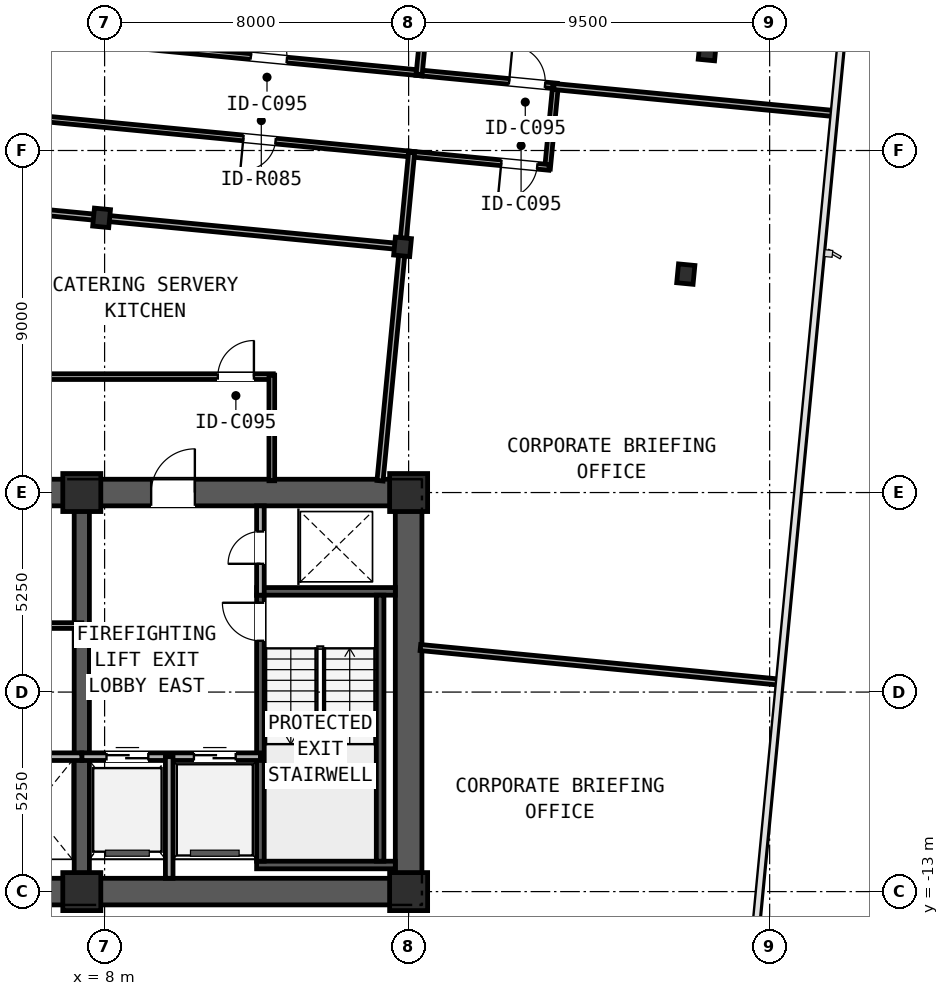
"""IFC4 building model, lengths in metres.
Left out: names, types, materials, properties, quantities, classifications, styles, units other than length and angle.
Written with IfcOpenShell. Run it as: python <this file> out.ifc"""

import sys

from ifc_helpers import new_model, si_unit, direction, frame, frame_2d, origin, origin_2d, place, context, subcontext, project, spatial, rectangle, i_section, extrude, element, fill, save


model = new_model("IFC4")
c1 = context("Model", 3, precision=1e-05, world=origin(), true_north=direction((0.0, 1.0)))
c2 = subcontext(c1, "Body", "Model", "MODEL_VIEW")
j1 = project(units=[si_unit("LENGTHUNIT", "METRE"), si_unit("PLANEANGLEUNIT", "RADIAN")], contexts=[c1])
p1 = place(None, origin())
s1 = spatial("IfcSite", under=j1, at=p1, CompositionType="ELEMENT")
p2 = place(p1, origin())
s2 = spatial("IfcBuilding", under=s1, at=p2, CompositionType="ELEMENT")
p3 = place(p2, frame((0.0, 0.0, 163.5)))
s3 = spatial("IfcBuildingStorey", under=s2, at=p3, CompositionType="ELEMENT", Elevation=163.5)
p4 = place(p3, frame((-16.35, -13.0, 0.0), z_axis=(0.0, 0.0, 1.0), x_axis=(1.0, 0.0, 0.0)))
e1 = element("IfcWall", 1, at=p4, inside=s3, PredefinedType="SHEAR", context=c2, shape_type="SweptSolid", body=[
    extrude(rectangle(XDim=32.7, YDim=0.7, at=frame_2d((16.35, 0.0))), origin(), (0.0, 0.0, 1.0), 2.91),
])
p5 = place(p3, frame((-16.35, -2.5, 0.0), z_axis=(0.0, 0.0, 1.0), x_axis=(1.0, 0.0, 0.0)))
e2 = element("IfcWall", 2, at=p5, inside=s3, PredefinedType="SHEAR", context=c2, shape_type="SweptSolid", body=[
    extrude(rectangle(XDim=32.7, YDim=0.7, at=frame_2d((16.35, 0.0))), origin(), (0.0, 0.0, 1.0), 2.91),
])
p6 = place(p5, frame((5.975, 0.0, 0.0)))
e3 = element("IfcOpeningElement", 3, at=p6, cuts=e2, PredefinedType="OPENING", context=c2, shape_type="SweptSolid", body=[
    extrude(rectangle(XDim=1.15, YDim=2.0, at=frame_2d((0.575, 1.0))), frame((0.0, 0.36, 0.0), z_axis=(0.0, -1.0, 0.0), x_axis=(1.0, 0.0, 0.0)), (0.0, 0.0, 1.0), 0.72),
])
p7 = place(p5, frame((15.55, 0.0, 0.0)))
e4 = element("IfcOpeningElement", 4, at=p7, cuts=e2, PredefinedType="OPENING", context=c2, shape_type="SweptSolid", body=[
    extrude(rectangle(XDim=1.6, YDim=2.0, at=frame_2d((0.8, 1.0))), frame((0.0, 0.36, 0.0), z_axis=(0.0, -1.0, 0.0), x_axis=(1.0, 0.0, 0.0)), (0.0, 0.0, 1.0), 0.72),
])
p8 = place(p5, frame((25.575, 0.0, 0.0)))
e5 = element("IfcOpeningElement", 5, at=p8, cuts=e2, PredefinedType="OPENING", context=c2, shape_type="SweptSolid", body=[
    extrude(rectangle(XDim=1.15, YDim=2.0, at=frame_2d((0.575, 1.0))), frame((0.0, 0.36, 0.0), z_axis=(0.0, -1.0, 0.0), x_axis=(1.0, 0.0, 0.0)), (0.0, 0.0, 1.0), 0.72),
])
p9 = place(p3, frame((16.0, -12.65, 0.0), z_axis=(0.0, 0.0, 1.0), x_axis=(0.0, 1.0, 0.0)))
e6 = element("IfcWall", 6, at=p9, inside=s3, PredefinedType="SHEAR", context=c2, shape_type="SweptSolid", body=[
    extrude(rectangle(XDim=9.8, YDim=0.7, at=frame_2d((4.9, 0.0))), origin(), (0.0, 0.0, 1.0), 2.91),
])
p10 = place(p3, frame((7.4, -12.65, 0.0), z_axis=(0.0, 0.0, 1.0), x_axis=(0.0, 1.0, 0.0)))
e7 = element("IfcWall", 7, at=p10, inside=s3, PredefinedType="SHEAR", context=c2, shape_type="SweptSolid", body=[
    extrude(rectangle(XDim=9.8, YDim=0.4, at=frame_2d((4.9, 0.0))), origin(), (0.0, 0.0, 1.0), 3.19),
])
for number, where, z_axis, x_axis in (
    (8, (12.0, -12.3, 0.0), (0.0, 0.0, 1.0), (1.0, 0.0, 0.0)),
    (9, (12.0, -5.1, 0.0), (0.0, 0.0, 1.0), (1.0, 0.0, 0.0)),
):
    element("IfcWall", number, at=place(p3, frame(where, z_axis=z_axis, x_axis=x_axis)), inside=s3, PredefinedType="SOLIDWALL", context=c2, shape_type="SweptSolid", body=[
        extrude(rectangle(XDim=3.65, YDim=0.2, at=frame_2d((1.825, 0.0))), origin(), (0.0, 0.0, 1.0), 3.19),
    ])
p11 = place(p3, frame((12.1, -12.2, 0.0), z_axis=(0.0, 0.0, 1.0), x_axis=(0.0, 1.0, 0.0)))
e10 = element("IfcWall", 10, at=p11, inside=s3, PredefinedType="SOLIDWALL", context=c2, shape_type="SweptSolid", body=[
    extrude(rectangle(XDim=7.0, YDim=0.2, at=frame_2d((3.5, 0.0))), origin(), (0.0, 0.0, 1.0), 3.19),
])
p12 = place(p11, frame((5.8, 0.0, 0.0)))
e11 = element("IfcOpeningElement", 11, at=p12, cuts=e10, PredefinedType="OPENING", context=c2, shape_type="SweptSolid", body=[
    extrude(rectangle(XDim=1.0, YDim=2.1, at=frame_2d((0.5, 1.05))), frame((0.0, 0.11, 0.0), z_axis=(0.0, -1.0, 0.0), x_axis=(1.0, 0.0, 0.0)), (0.0, 0.0, 1.0), 0.22),
])
p13 = place(p3, frame((15.25, -12.2, 0.0), z_axis=(0.0, 0.0, 1.0), x_axis=(0.0, 1.0, 0.0)))
e12 = element("IfcWall", 12, at=p13, inside=s3, PredefinedType="SOLIDWALL", context=c2, shape_type="SweptSolid", body=[
    extrude(rectangle(XDim=7.0, YDim=0.2, at=frame_2d((3.5, 0.0))), origin(), (0.0, 0.0, 1.0), 3.19),
])
for number, where, z_axis, x_axis in (
    (13, (7.4, -13.0, 0.0), (0.0, 0.0, 1.0), (1.0, 0.0, 0.0)),
    (14, (16.0, -13.0, 0.0), (0.0, 0.0, 1.0), (1.0, 0.0, 0.0)),
    (15, (7.4, -2.5, 0.0), (0.0, 0.0, 1.0), (1.0, 0.0, 0.0)),
    (16, (16.0, -2.5, 0.0), (0.0, 0.0, 1.0), (1.0, 0.0, 0.0)),
):
    element("IfcColumn", number, at=place(p3, frame(where, z_axis=z_axis, x_axis=x_axis)), inside=s3, PredefinedType="COLUMN", context=c2, shape_type="SweptSolid", body=[
        extrude(rectangle(XDim=1.0, YDim=1.0, at=origin_2d()), origin(), (0.0, 0.0, 1.0), 3.45),
    ])
for number, where, z_axis, x_axis in (
    (17, (7.921, 4.728, 0.0), (0.0, 0.0, 1.0), (0.995, -0.096, 0.0)),
    (18, (15.84, 3.965, 0.0), (0.0, 0.0, 1.0), (0.995, -0.096, 0.0)),
):
    element("IfcColumn", number, at=place(p3, frame(where, z_axis=z_axis, x_axis=x_axis)), inside=s3, PredefinedType="COLUMN", context=c2, shape_type="SweptSolid", body=[
        extrude(i_section(OverallWidth=0.424, OverallDepth=0.474, WebThickness=0.048, FlangeThickness=0.077, FilletRadius=0.031, at=origin_2d()), origin(), (0.0, 0.0, 1.0), 3.45),
    ])
for number, where, z_axis, x_axis in (
    (19, (23.293, 3.248, 0.0), (0.0, 0.0, 1.0), (0.995, -0.096, 0.0)),
    (20, (23.86, 9.128, 0.0), (0.0, 0.0, 1.0), (0.995, -0.096, 0.0)),
):
    element("IfcColumn", number, at=place(p3, frame(where, z_axis=z_axis, x_axis=x_axis)), inside=s3, PredefinedType="COLUMN", context=c2, shape_type="SweptSolid", body=[
        extrude(i_section(OverallWidth=0.432, OverallDepth=0.498, WebThickness=0.056, FlangeThickness=0.089, FilletRadius=0.031, at=origin_2d()), origin(), (0.0, 0.0, 1.0), 3.45),
    ])
p14 = place(p3, frame((-26.695, -13.016, 0.0), z_axis=(0.0, 0.0, 1.0), x_axis=(0.995396268366, -0.095845025554, 0.0)))
e21 = element("IfcWall", 21, at=p14, inside=s3, PredefinedType="STANDARD", context=c2, shape_type="SweptSolid", body=[
    extrude(rectangle(XDim=49.6, YDim=0.24, at=frame_2d((24.8, 0.0))), origin(), (0.0, 0.0, 1.0), 3.19),
])
p15 = place(p14, frame((6.044, 0.0, 0.7)))
e22 = element("IfcOpeningElement", 22, at=p15, cuts=e21, PredefinedType="OPENING", context=c2, shape_type="SweptSolid", body=[
    extrude(rectangle(XDim=1.8, YDim=1.5, at=frame_2d((0.9, 0.75))), frame((0.0, 0.13, 0.0), z_axis=(0.0, -1.0, 0.0), x_axis=(1.0, 0.0, 0.0)), (0.0, 0.0, 1.0), 0.26),
])
p16 = place(p14, frame((41.756, 0.0, 0.7)))
e23 = element("IfcOpeningElement", 23, at=p16, cuts=e21, PredefinedType="OPENING", context=c2, shape_type="SweptSolid", body=[
    extrude(rectangle(XDim=1.8, YDim=1.5, at=frame_2d((0.9, 0.75))), frame((0.0, 0.13, 0.0), z_axis=(0.0, -1.0, 0.0), x_axis=(1.0, 0.0, 0.0)), (0.0, 0.0, 1.0), 0.26),
])
p17 = place(p3, frame((12.1, -5.2, 0.0), z_axis=(0.0, 0.0, 1.0), x_axis=(0.0, 1.0, 0.0)))
e24 = element("IfcWall", 24, at=p17, inside=s3, PredefinedType="PARTITIONING", context=c2, shape_type="SweptSolid", body=[
    extrude(rectangle(XDim=2.35, YDim=0.2, at=frame_2d((1.175, 0.0))), origin(), (0.0, 0.0, 1.0), 2.225),
])
p18 = place(p17, frame((0.825, 0.0, 0.0)))
e25 = element("IfcOpeningElement", 25, at=p18, cuts=e24, PredefinedType="OPENING", context=c2, shape_type="SweptSolid", body=[
    extrude(rectangle(XDim=0.85, YDim=2.05, at=frame_2d((0.425, 1.025))), frame((0.0, 0.11, 0.0), z_axis=(0.0, -1.0, 0.0), x_axis=(1.0, 0.0, 0.0)), (0.0, 0.0, 1.0), 0.22),
])
p19 = place(p3, frame((7.4, -9.45, 0.0), z_axis=(0.0, 0.0, 1.0), x_axis=(1.0, 0.0, 0.0)))
e26 = element("IfcWall", 26, at=p19, inside=s3, PredefinedType="PARTITIONING", context=c2, shape_type="SweptSolid", body=[
    extrude(rectangle(XDim=4.7, YDim=0.2, at=frame_2d((2.35, 0.0))), origin(), (0.0, 0.0, 1.0), 3.19),
])
p20 = place(p19, frame((2.95, 0.0, 0.0)))
e27 = element("IfcOpeningElement", 27, at=p20, cuts=e26, PredefinedType="OPENING", context=c2, shape_type="SweptSolid", body=[
    extrude(rectangle(XDim=1.1, YDim=2.2, at=frame_2d((0.55, 1.1))), frame((0.0, 0.11, 0.0), z_axis=(0.0, -1.0, 0.0), x_axis=(1.0, 0.0, 0.0)), (0.0, 0.0, 1.0), 0.22),
])
p21 = place(p19, frame((0.65, 0.0, 0.0)))
e28 = element("IfcOpeningElement", 28, at=p21, cuts=e26, PredefinedType="OPENING", context=c2, shape_type="SweptSolid", body=[
    extrude(rectangle(XDim=1.1, YDim=2.2, at=frame_2d((0.55, 1.1))), frame((0.0, 0.11, 0.0), z_axis=(0.0, -1.0, 0.0), x_axis=(1.0, 0.0, 0.0)), (0.0, 0.0, 1.0), 0.22),
])
p22 = place(p3, frame((9.7, -12.65, 0.0), z_axis=(0.0, 0.0, 1.0), x_axis=(0.0, 1.0, 0.0)))
e29 = element("IfcWall", 29, at=p22, inside=s3, PredefinedType="PARTITIONING", context=c2, shape_type="SweptSolid", body=[
    extrude(rectangle(XDim=3.2, YDim=0.2, at=frame_2d((1.6, 0.0))), origin(), (0.0, 0.0, 1.0), 2.225),
])
p23 = place(p3, frame((2.55, -9.45, 0.0), z_axis=(0.0, 0.0, 1.0), x_axis=(1.0, 0.0, 0.0)))
e30 = element("IfcWall", 30, at=p23, inside=s3, PredefinedType="PARTITIONING", context=c2, shape_type="SweptSolid", body=[
    extrude(rectangle(XDim=4.85, YDim=0.2, at=frame_2d((2.425, 0.0))), origin(), (0.0, 0.0, 1.0), 3.19),
])
p24 = place(p3, frame((1.6, -6.0, 0.0), z_axis=(0.0, 0.0, 1.0), x_axis=(1.0, 0.0, 0.0)))
e31 = element("IfcWall", 31, at=p24, inside=s3, PredefinedType="PARTITIONING", context=c2, shape_type="SweptSolid", body=[
    extrude(rectangle(XDim=5.8, YDim=0.15, at=frame_2d((2.9, 0.0))), origin(), (0.0, 0.0, 1.0), 3.19),
])
p25 = place(p24, frame((1.2, 0.0, 0.0)))
e32 = element("IfcOpeningElement", 32, at=p25, cuts=e31, PredefinedType="OPENING", context=c2, shape_type="SweptSolid", body=[
    extrude(rectangle(XDim=0.9, YDim=2.1, at=frame_2d((0.45, 1.05))), frame((0.0, 0.085, 0.0), z_axis=(0.0, -1.0, 0.0), x_axis=(1.0, 0.0, 0.0)), (0.0, 0.0, 1.0), 0.17),
])
p26 = place(p24, frame((4.025, 0.0, 0.0)))
e33 = element("IfcOpeningElement", 33, at=p26, cuts=e31, PredefinedType="OPENING", context=c2, shape_type="SweptSolid", body=[
    extrude(rectangle(XDim=0.85, YDim=2.05, at=frame_2d((0.425, 1.025))), frame((0.0, 0.085, 0.0), z_axis=(0.0, -1.0, 0.0), x_axis=(1.0, 0.0, 0.0)), (0.0, 0.0, 1.0), 0.17),
])
p27 = place(p3, frame((8.28, 9.314, 0.0), z_axis=(0.0, 0.0, 1.0), x_axis=(0.995395467524, -0.095853342309, 0.0)))
e34 = element("IfcWall", 34, at=p27, inside=s3, PredefinedType="PARTITIONING", context=c2, shape_type="SweptSolid", body=[
    extrude(rectangle(XDim=8.12, YDim=0.15, at=frame_2d((4.06, 0.0))), origin(), (0.0, 0.0, 1.0), 2.479),
])
p28 = place(p27, frame((3.585, 0.0, 0.0)))
e35 = element("IfcOpeningElement", 35, at=p28, cuts=e34, PredefinedType="OPENING", context=c2, shape_type="SweptSolid", body=[
    extrude(rectangle(XDim=0.95, YDim=2.15, at=frame_2d((0.475, 1.075))), frame((0.0, 0.085, 0.0), z_axis=(0.0, -1.0, 0.0), x_axis=(1.0, 0.0, 0.0)), (0.0, 0.0, 1.0), 0.17),
])
p29 = place(p3, frame((16.199, 8.552, 0.0), z_axis=(0.0, 0.0, 1.0), x_axis=(0.995391104887, -0.095898635608, 0.0)))
e36 = element("IfcWall", 36, at=p29, inside=s3, PredefinedType="PARTITIONING", context=c2, shape_type="SweptSolid", body=[
    extrude(rectangle(XDim=3.722, YDim=0.15, at=frame_2d((1.861, 0.0))), origin(), (0.0, 0.0, 1.0), 2.479),
])
p30 = place(p29, frame((2.457, 0.0, 0.0)))
e37 = element("IfcOpeningElement", 37, at=p30, cuts=e36, PredefinedType="OPENING", context=c2, shape_type="SweptSolid", body=[
    extrude(rectangle(XDim=0.95, YDim=2.15, at=frame_2d((0.475, 1.075))), frame((0.0, 0.085, 0.0), z_axis=(0.0, -1.0, 0.0), x_axis=(1.0, 0.0, 0.0)), (0.0, 0.0, 1.0), 0.17),
])
p31 = place(p3, frame((16.156, 6.396, 0.0), z_axis=(0.0, 0.0, 1.0), x_axis=(-0.99539478422, 0.095860437863, 0.0)))
e38 = element("IfcWall", 38, at=p31, inside=s3, PredefinedType="PARTITIONING", context=c2, shape_type="SweptSolid", body=[
    extrude(rectangle(XDim=10.936, YDim=0.15, at=frame_2d((5.468, 0.0))), origin(), (0.0, 0.0, 1.0), 2.479),
])
p32 = place(p31, frame((3.675, 0.0, 0.0)))
e39 = element("IfcOpeningElement", 39, at=p32, cuts=e38, PredefinedType="OPENING", context=c2, shape_type="SweptSolid", body=[
    extrude(rectangle(XDim=0.85, YDim=2.05, at=frame_2d((0.425, 1.025))), frame((0.0, 0.085, 0.0), z_axis=(0.0, -1.0, 0.0), x_axis=(1.0, 0.0, 0.0)), (0.0, 0.0, 1.0), 0.17),
])
p33 = place(p3, frame((4.607, 0.55, 0.0), z_axis=(0.0, 0.0, 1.0), x_axis=(1.0, 0.0, 0.0)))
e40 = element("IfcWall", 40, at=p33, inside=s3, PredefinedType="PARTITIONING", context=c2, shape_type="SweptSolid", body=[
    extrude(rectangle(XDim=7.833, YDim=0.15, at=frame_2d((3.917, 0.0))), origin(), (0.0, 0.0, 1.0), 2.479),
])
p34 = place(p33, frame((6.372, 0.0, 0.0)))
e41 = element("IfcOpeningElement", 41, at=p34, cuts=e40, PredefinedType="OPENING", context=c2, shape_type="SweptSolid", body=[
    extrude(rectangle(XDim=0.95, YDim=2.15, at=frame_2d((0.475, 1.075))), frame((0.0, 0.085, 0.0), z_axis=(0.0, -1.0, 0.0), x_axis=(1.0, 0.0, 0.0)), (0.0, 0.0, 1.0), 0.17),
])
p35 = place(p3, frame((12.4, 0.59, 0.0), z_axis=(0.0, 0.0, 1.0), x_axis=(0.0, -1.0, 0.0)))
e42 = element("IfcWall", 42, at=p35, inside=s3, PredefinedType="PARTITIONING", context=c2, shape_type="SweptSolid", body=[
    extrude(rectangle(XDim=2.78, YDim=0.15, at=frame_2d((1.39, 0.0))), origin(), (0.0, 0.0, 1.0), 2.225),
])
p36 = place(p3, frame((19.866, 8.219, 0.0), z_axis=(0.0, 0.0, 1.0), x_axis=(-0.095773447772, -0.995403157872, 0.0)))
e43 = element("IfcWall", 43, at=p36, inside=s3, PredefinedType="PARTITIONING", context=c2, shape_type="SweptSolid", body=[
    extrude(rectangle(XDim=2.21, YDim=0.15, at=frame_2d((1.105, 0.0))), origin(), (0.0, 0.0, 1.0), 2.718),
])
p37 = place(p3, frame((19.698, 6.055, 0.0), z_axis=(0.0, 0.0, 1.0), x_axis=(-0.995397364202, 0.095833644092, 0.0)))
e44 = element("IfcWall", 44, at=p37, inside=s3, PredefinedType="PARTITIONING", context=c2, shape_type="SweptSolid", body=[
    extrude(rectangle(XDim=3.722, YDim=0.15, at=frame_2d((1.861, 0.0))), origin(), (0.0, 0.0, 1.0), 2.479),
])
p38 = place(p37, frame((0.315, 0.0, 0.0)))
e45 = element("IfcOpeningElement", 45, at=p38, cuts=e44, PredefinedType="OPENING", context=c2, shape_type="SweptSolid", body=[
    extrude(rectangle(XDim=0.95, YDim=2.15, at=frame_2d((0.475, 1.075))), frame((0.0, 0.085, 0.0), z_axis=(0.0, -1.0, 0.0), x_axis=(1.0, 0.0, 0.0)), (0.0, 0.0, 1.0), 0.17),
])
p39 = place(p3, frame((16.389, 9.671, 0.0), z_axis=(0.0, 0.0, 1.0), x_axis=(-0.095811626391, -0.995399483749, 0.0)))
e46 = element("IfcWall", 46, at=p39, inside=s3, PredefinedType="PARTITIONING", context=c2, shape_type="SweptSolid", body=[
    extrude(rectangle(XDim=1.172, YDim=0.16, at=frame_2d((0.586, 0.0))), origin(), (0.0, 0.0, 1.0), 2.479),
])
p40 = place(p3, frame((27.236, 7.469, 0.0), z_axis=(0.0, 0.0, 1.0), x_axis=(-0.995396228159, 0.095845443117, 0.0)))
e47 = element("IfcWall", 47, at=p40, inside=s3, PredefinedType="PARTITIONING", context=c2, shape_type="SweptSolid", body=[
    extrude(rectangle(XDim=7.448, YDim=0.16, at=frame_2d((3.724, 0.0))), origin(), (0.0, 0.0, 1.0), 2.558),
])
p41 = place(p3, frame((7.745, 4.745, 0.0), z_axis=(0.0, 0.0, 1.0), x_axis=(-0.995392910691, 0.095879890208, 0.0)))
e48 = element("IfcWall", 48, at=p41, inside=s3, PredefinedType="PARTITIONING", context=c2, shape_type="SweptSolid", body=[
    extrude(rectangle(XDim=2.722, YDim=0.16, at=frame_2d((1.361, 0.0))), origin(), (0.0, 0.0, 1.0), 2.479),
])
p42 = place(p3, frame((15.665, 3.982, 0.0), z_axis=(0.0, 0.0, 1.0), x_axis=(-0.995396667246, 0.095840882902, 0.0)))
e49 = element("IfcWall", 49, at=p42, inside=s3, PredefinedType="PARTITIONING", context=c2, shape_type="SweptSolid", body=[
    extrude(rectangle(XDim=7.604, YDim=0.16, at=frame_2d((3.802, 0.0))), origin(), (0.0, 0.0, 1.0), 2.479),
])
p43 = place(p3, frame((16.079, 6.444, 0.0), z_axis=(0.0, 0.0, 1.0), x_axis=(-0.095794827695, -0.995401100555, 0.0)))
e50 = element("IfcWall", 50, at=p43, inside=s3, PredefinedType="PARTITIONING", context=c2, shape_type="SweptSolid", body=[
    extrude(rectangle(XDim=2.314, YDim=0.16, at=frame_2d((1.157, 0.0))), origin(), (0.0, 0.0, 1.0), 2.479),
])
p44 = place(p3, frame((15.823, 3.79, 0.0), z_axis=(0.0, 0.0, 1.0), x_axis=(-0.095865726078, -0.99539427493, 0.0)))
e51 = element("IfcWall", 51, at=p44, inside=s3, PredefinedType="PARTITIONING", context=c2, shape_type="SweptSolid", body=[
    extrude(rectangle(XDim=6.008, YDim=0.16, at=frame_2d((3.004, 0.0))), origin(), (0.0, 0.0, 1.0), 2.225),
])
p45 = place(p3, frame((25.796, -7.492, 0.0), z_axis=(0.0, 0.0, 1.0), x_axis=(-0.995396487733, 0.095842747294, 0.0)))
e52 = element("IfcWall", 52, at=p45, inside=s3, PredefinedType="PARTITIONING", context=c2, shape_type="SweptSolid", body=[
    extrude(rectangle(XDim=9.53, YDim=0.16, at=frame_2d((4.765, 0.0))), origin(), (0.0, 0.0, 1.0), 2.225),
])
p46 = place(p12, origin())
e53 = element("IfcDoor", 53, at=p46, inside=s3, OperationType="SINGLE_SWING_RIGHT", PredefinedType="DOOR", context=c2, shape_type="SweptSolid", body=[
    extrude(rectangle(XDim=1.0, YDim=2.1, at=frame_2d((0.5, 1.05))), frame((0.0, 0.025, 0.0), z_axis=(0.0, -1.0, 0.0), x_axis=(1.0, 0.0, 0.0)), (0.0, 0.0, 1.0), 0.05),
])
fill(e11, e53)
p47 = place(p18, frame((0.85, 0.0, 0.0), z_axis=(0.0, 0.0, 1.0), x_axis=(-1.0, 0.0, 0.0)))
e54 = element("IfcDoor", 54, at=p47, inside=s3, OperationType="SINGLE_SWING_LEFT", PredefinedType="DOOR", context=c2, shape_type="SweptSolid", body=[
    extrude(rectangle(XDim=0.85, YDim=2.05, at=frame_2d((0.425, 1.025))), frame((0.0, 0.025, 0.0), z_axis=(0.0, -1.0, 0.0), x_axis=(1.0, 0.0, 0.0)), (0.0, 0.0, 1.0), 0.05),
])
fill(e25, e54)
p48 = place(p20, origin())
e55 = element("IfcDoor", 55, at=p48, inside=s3, OperationType="SLIDING_TO_LEFT", PredefinedType="DOOR", context=c2, shape_type="SweptSolid", body=[
    extrude(rectangle(XDim=1.1, YDim=2.2, at=frame_2d((0.55, 1.1))), frame((0.0, 0.025, 0.0), z_axis=(0.0, -1.0, 0.0), x_axis=(1.0, 0.0, 0.0)), (0.0, 0.0, 1.0), 0.05),
])
fill(e27, e55)
p49 = place(p21, origin())
e56 = element("IfcDoor", 56, at=p49, inside=s3, OperationType="SLIDING_TO_RIGHT", PredefinedType="DOOR", context=c2, shape_type="SweptSolid", body=[
    extrude(rectangle(XDim=1.1, YDim=2.2, at=frame_2d((0.55, 1.1))), frame((0.0, 0.025, 0.0), z_axis=(0.0, -1.0, 0.0), x_axis=(1.0, 0.0, 0.0)), (0.0, 0.0, 1.0), 0.05),
])
fill(e28, e56)
p50 = place(p8, origin())
e57 = element("IfcDoor", 57, at=p50, inside=s3, OperationType="SINGLE_SWING_RIGHT", PredefinedType="DOOR", context=c2, shape_type="SweptSolid", body=[
    extrude(rectangle(XDim=1.15, YDim=2.0, at=frame_2d((0.575, 1.0))), frame((0.0, 0.025, 0.0), z_axis=(0.0, -1.0, 0.0), x_axis=(1.0, 0.0, 0.0)), (0.0, 0.0, 1.0), 0.05),
])
fill(e5, e57)
p51 = place(p28, frame((0.95, 0.0, 0.0), z_axis=(0.0, 0.0, 1.0), x_axis=(-1.0, 0.0, 0.0)))
e58 = element("IfcDoor", 58, at=p51, inside=s3, OperationType="SINGLE_SWING_LEFT", PredefinedType="DOOR", context=c2, shape_type="SweptSolid", body=[
    extrude(rectangle(XDim=0.95, YDim=2.15, at=frame_2d((0.475, 1.075))), frame((0.0, 0.025, 0.0), z_axis=(0.0, -1.0, 0.0), x_axis=(1.0, 0.0, 0.0)), (0.0, 0.0, 1.0), 0.05),
])
fill(e35, e58)
p52 = place(p30, frame((0.95, 0.0, 0.0), z_axis=(0.0, 0.0, 1.0), x_axis=(-1.0, 0.0, 0.0)))
e59 = element("IfcDoor", 59, at=p52, inside=s3, OperationType="SINGLE_SWING_LEFT", PredefinedType="DOOR", context=c2, shape_type="SweptSolid", body=[
    extrude(rectangle(XDim=0.95, YDim=2.15, at=frame_2d((0.475, 1.075))), frame((0.0, 0.025, 0.0), z_axis=(0.0, -1.0, 0.0), x_axis=(1.0, 0.0, 0.0)), (0.0, 0.0, 1.0), 0.05),
])
fill(e37, e59)
p53 = place(p32, frame((0.85, 0.0, 0.0), z_axis=(0.0, 0.0, 1.0), x_axis=(-1.0, 0.0, 0.0)))
e60 = element("IfcDoor", 60, at=p53, inside=s3, OperationType="SINGLE_SWING_RIGHT", PredefinedType="DOOR", context=c2, shape_type="SweptSolid", body=[
    extrude(rectangle(XDim=0.85, YDim=2.05, at=frame_2d((0.425, 1.025))), frame((0.0, 0.025, 0.0), z_axis=(0.0, -1.0, 0.0), x_axis=(1.0, 0.0, 0.0)), (0.0, 0.0, 1.0), 0.05),
])
fill(e39, e60)
p54 = place(p34, origin())
e61 = element("IfcDoor", 61, at=p54, inside=s3, OperationType="SINGLE_SWING_RIGHT", PredefinedType="DOOR", context=c2, shape_type="SweptSolid", body=[
    extrude(rectangle(XDim=0.95, YDim=2.15, at=frame_2d((0.475, 1.075))), frame((0.0, 0.025, 0.0), z_axis=(0.0, -1.0, 0.0), x_axis=(1.0, 0.0, 0.0)), (0.0, 0.0, 1.0), 0.05),
])
fill(e41, e61)
p55 = place(p38, frame((0.95, 0.0, 0.0), z_axis=(0.0, 0.0, 1.0), x_axis=(-1.0, 0.0, 0.0)))
e62 = element("IfcDoor", 62, at=p55, inside=s3, OperationType="SINGLE_SWING_RIGHT", PredefinedType="DOOR", context=c2, shape_type="SweptSolid", body=[
    extrude(rectangle(XDim=0.95, YDim=2.15, at=frame_2d((0.475, 1.075))), frame((0.0, 0.025, 0.0), z_axis=(0.0, -1.0, 0.0), x_axis=(1.0, 0.0, 0.0)), (0.0, 0.0, 1.0), 0.05),
])
fill(e45, e62)
save(model, sys.argv[1])
